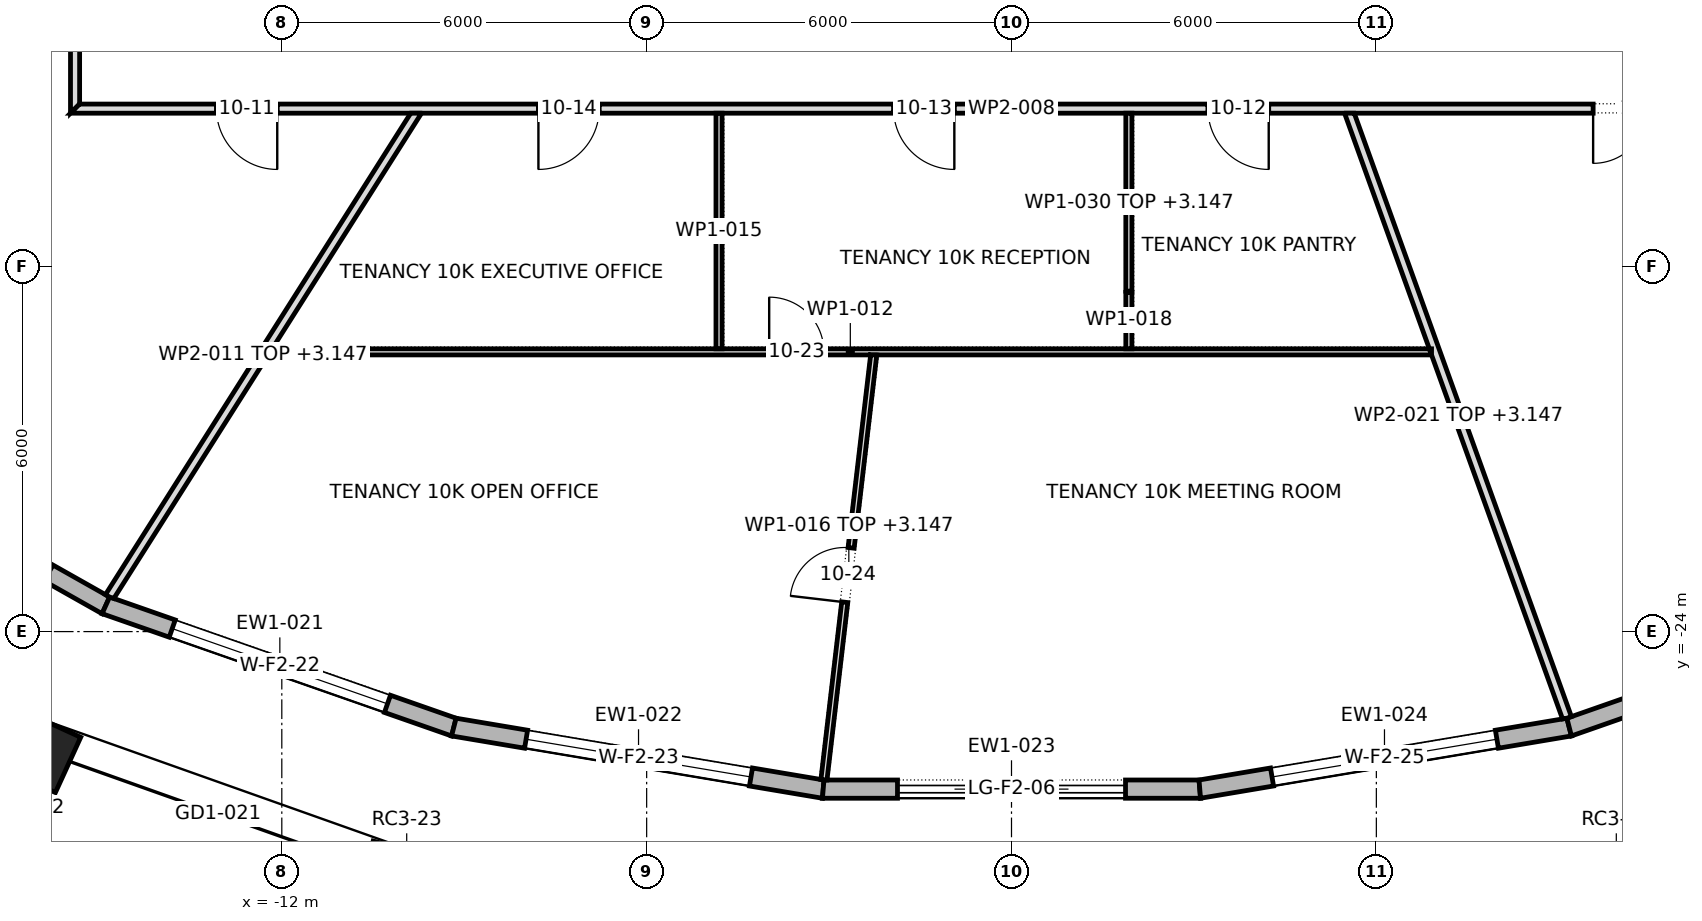
"""IFC4 building model, lengths in metres.
Left out: names, types, materials, properties, quantities, classifications, styles, units other than length and angle.
Written with IfcOpenShell. Run it as: python <this file> out.ifc"""

import sys

from ifc_helpers import new_model, si_unit, direction, frame, frame_2d, origin, origin_2d, place, context, subcontext, project, spatial, polyline, rectangle, outline, extrude, element, fill, save


model = new_model("IFC4")
c1 = context("Model", 3, precision=1e-05, world=origin(), true_north=direction((0.0, 1.0)))
c2 = subcontext(c1, "Body", "Model", "MODEL_VIEW")
j1 = project(units=[si_unit("LENGTHUNIT", "METRE"), si_unit("PLANEANGLEUNIT", "RADIAN")], contexts=[c1])
p1 = place(None, origin())
s1 = spatial("IfcSite", under=j1, at=p1, CompositionType="ELEMENT")
p2 = place(p1, origin())
s2 = spatial("IfcBuilding", under=s1, at=p2, CompositionType="ELEMENT")
p3 = place(p2, frame((0.0, 0.0, 142.3)))
s3 = spatial("IfcBuildingStorey", under=s2, at=p3, CompositionType="ELEMENT", Elevation=142.3)
p4 = place(p3, frame((-16.152, -25.901, 0.0), z_axis=(0.0, 0.0, 1.0), x_axis=(0.909127095833, -0.416518815449, 0.0)))
e1 = element("IfcColumn", 1, at=p4, inside=s3, PredefinedType="COLUMN", context=c2, shape_type="SweptSolid", body=[
    extrude(rectangle(XDim=1.4, YDim=1.0, at=origin_2d()), origin(), (0.0, 0.0, 1.0), 4.2),
])
p5 = place(p3, frame((-20.046, -20.661, 0.0), z_axis=(0.0, 0.0, 1.0), x_axis=(0.870912346166, -0.491438384028, 0.0)))
e2 = element("IfcWall", 2, at=p5, inside=s3, PredefinedType="STANDARD", context=c2, shape_type="SweptSolid", body=[
    extrude(outline(polyline([(-0.014, -0.15), (5.929, -0.15), (5.902, 0.15), (0.014, 0.15), (-0.014, -0.15)])), origin(), (0.0, 0.0, 1.0), 3.9),
])
p6 = place(p5, frame((1.083, 0.0, 0.6)))
e3 = element("IfcOpeningElement", 3, at=p6, cuts=e2, PredefinedType="OPENING", context=c2, shape_type="SweptSolid", body=[
    extrude(rectangle(XDim=3.75, YDim=2.85, at=frame_2d((1.875, 1.425))), frame((0.0, 0.162, 0.0), z_axis=(0.0, -1.0, 0.0), x_axis=(1.0, 0.0, 0.0)), (0.0, 0.0, 1.0), 0.324),
])
p7 = place(p3, frame((-14.894, -23.569, 0.0), z_axis=(0.0, 0.0, 1.0), x_axis=(0.943925510212, -0.330158494016, 0.0)))
e4 = element("IfcWall", 4, at=p7, inside=s3, PredefinedType="STANDARD", context=c2, shape_type="SweptSolid", body=[
    extrude(outline(polyline([(-0.013, -0.15), (6.076, -0.15), (6.05, 0.15), (0.013, 0.15), (-0.013, -0.15)])), origin(), (0.0, 0.0, 1.0), 3.9),
])
p8 = place(p7, frame((1.156, 0.0, 0.6)))
e5 = element("IfcOpeningElement", 5, at=p8, cuts=e4, PredefinedType="OPENING", context=c2, shape_type="SweptSolid", body=[
    extrude(rectangle(XDim=3.75, YDim=2.85, at=frame_2d((1.875, 1.425))), frame((0.0, 0.162, 0.0), z_axis=(0.0, -1.0, 0.0), x_axis=(1.0, 0.0, 0.0)), (0.0, 0.0, 1.0), 0.324),
])
p9 = place(p3, frame((-9.171, -25.57, 0.0), z_axis=(0.0, 0.0, 1.0), x_axis=(0.986186393203, -0.165639360845, 0.0)))
e6 = element("IfcWall", 6, at=p9, inside=s3, PredefinedType="STANDARD", context=c2, shape_type="SweptSolid", body=[
    extrude(outline(polyline([(-0.013, -0.15), (6.172, -0.15), (6.147, 0.15), (0.013, 0.15), (-0.013, -0.15)])), origin(), (0.0, 0.0, 1.0), 3.9),
])
p10 = place(p9, frame((1.205, 0.0, 0.6)))
e7 = element("IfcOpeningElement", 7, at=p10, cuts=e6, PredefinedType="OPENING", context=c2, shape_type="SweptSolid", body=[
    extrude(rectangle(XDim=3.75, YDim=2.85, at=frame_2d((1.875, 1.425))), frame((0.0, 0.162, 0.0), z_axis=(0.0, -1.0, 0.0), x_axis=(1.0, 0.0, 0.0)), (0.0, 0.0, 1.0), 0.324),
])
p11 = place(p3, frame((-3.096, -26.591, 0.0), z_axis=(0.0, 0.0, 1.0), x_axis=(1.0, 0.0, 0.0)))
e8 = element("IfcWall", 8, at=p11, inside=s3, PredefinedType="STANDARD", context=c2, shape_type="SweptSolid", body=[
    extrude(outline(polyline([(-0.012, -0.15), (6.205, -0.15), (6.18, 0.15), (0.012, 0.15), (-0.012, -0.15)])), origin(), (0.0, 0.0, 1.0), 3.9),
])
p12 = place(p11, frame((1.221, 0.0, 0.0)))
e9 = element("IfcOpeningElement", 9, at=p12, cuts=e8, PredefinedType="OPENING", context=c2, shape_type="SweptSolid", body=[
    extrude(rectangle(XDim=3.75, YDim=3.45, at=frame_2d((1.875, 1.725))), frame((0.0, 0.162, 0.0), z_axis=(0.0, -1.0, 0.0), x_axis=(1.0, 0.0, 0.0)), (0.0, 0.0, 1.0), 0.324),
])
p13 = place(p3, frame((3.096, -26.591, 0.0), z_axis=(0.0, 0.0, 1.0), x_axis=(0.986186393203, 0.165639360845, 0.0)))
e10 = element("IfcWall", 10, at=p13, inside=s3, PredefinedType="STANDARD", context=c2, shape_type="SweptSolid", body=[
    extrude(outline(polyline([(-0.012, -0.15), (6.172, -0.15), (6.147, 0.15), (0.012, 0.15), (-0.012, -0.15)])), origin(), (0.0, 0.0, 1.0), 3.9),
])
p14 = place(p13, frame((1.205, 0.0, 0.6)))
e11 = element("IfcOpeningElement", 11, at=p14, cuts=e10, PredefinedType="OPENING", context=c2, shape_type="SweptSolid", body=[
    extrude(rectangle(XDim=3.75, YDim=2.85, at=frame_2d((1.875, 1.425))), frame((0.0, 0.162, 0.0), z_axis=(0.0, -1.0, 0.0), x_axis=(1.0, 0.0, 0.0)), (0.0, 0.0, 1.0), 0.324),
])
p15 = place(p3, frame((9.171, -25.57, 0.0), z_axis=(0.0, 0.0, 1.0), x_axis=(0.943925510212, 0.330158494016, 0.0)))
e12 = element("IfcWall", 12, at=p15, inside=s3, PredefinedType="STANDARD", context=c2, shape_type="SweptSolid", body=[
    extrude(outline(polyline([(-0.013, -0.15), (6.076, -0.15), (6.05, 0.15), (0.013, 0.15), (-0.013, -0.15)])), origin(), (0.0, 0.0, 1.0), 3.9),
])
p16 = place(p15, frame((1.156, 0.0, 0.6)))
e13 = element("IfcOpeningElement", 13, at=p16, cuts=e12, PredefinedType="OPENING", context=c2, shape_type="SweptSolid", body=[
    extrude(rectangle(XDim=3.75, YDim=2.85, at=frame_2d((1.875, 1.425))), frame((0.0, 0.162, 0.0), z_axis=(0.0, -1.0, 0.0), x_axis=(1.0, 0.0, 0.0)), (0.0, 0.0, 1.0), 0.324),
])
p17 = place(p3, frame((-24.324, -16.859, 0.0), z_axis=(0.0, 0.0, 1.0), x_axis=(0.821700462415, 0.569919599652, 0.0)))
e14 = element("IfcWall", 14, at=p17, inside=s3, PredefinedType="PARTITIONING", context=c2, shape_type="SweptSolid", body=[
    extrude(outline(polyline([(0.025, -0.075), (1.807, -0.075), (3.589, -0.075), (5.371, -0.075), (7.153, -0.075), (8.935, -0.075), (10.717, -0.075), (10.82, 0.074), (10.82, 0.075), (9.249, 0.075), (7.677, 0.075), (6.105, 0.075), (6.104, 0.073), (6.102, 0.075), (4.576, 0.075), (3.051, 0.075), (1.525, 0.075), (0.0, 0.075), (0.0, 0.071), (0.004, 0.002), (0.025, -0.075)])), origin(), (0.0, 0.0, 1.0), 3.147),
])
p18 = place(p3, frame((-15.4, -15.475, 0.0), z_axis=(0.0, 0.0, 1.0), x_axis=(0.0, 1.0, 0.0)))
e15 = element("IfcWall", 15, at=p18, inside=s3, PredefinedType="PARTITIONING", context=c2, shape_type="SweptSolid", body=[
    extrude(outline(polyline([(0.15, -0.075), (2.066, -0.075), (3.981, -0.075), (5.897, -0.075), (7.812, -0.075), (9.728, -0.075), (11.644, -0.075), (13.56, -0.075), (15.475, -0.075), (17.391, -0.075), (19.306, -0.075), (21.222, -0.075), (23.138, -0.075), (25.053, -0.075), (26.969, -0.075), (28.885, -0.075), (30.8, -0.075), (30.95, 0.075), (29.016, 0.075), (27.081, 0.075), (25.147, 0.075), (23.212, 0.075), (21.278, 0.075), (19.344, 0.075), (17.409, 0.075), (15.475, 0.075), (13.541, 0.075), (11.606, 0.075), (9.672, 0.075), (7.738, 0.075), (5.803, 0.075), (3.869, 0.075), (1.935, 0.075), (0.0, 0.075), (0.15, -0.075)])), origin(), (0.0, 0.0, 1.0), 3.9),
])
p19 = place(p18, frame((24.245, 0.0, 0.0)))
e16 = element("IfcOpeningElement", 16, at=p19, cuts=e15, PredefinedType="OPENING", context=c2, shape_type="SweptSolid", body=[
    extrude(rectangle(XDim=1.8, YDim=2.1, at=frame_2d((0.9, 1.05))), frame((0.0, 0.087, 0.0), z_axis=(0.0, -1.0, 0.0), x_axis=(1.0, 0.0, 0.0)), (0.0, 0.0, 1.0), 0.174),
])
p20 = place(p18, frame((16.305, 0.0, 0.0)))
e17 = element("IfcOpeningElement", 17, at=p20, cuts=e15, PredefinedType="OPENING", context=c2, shape_type="SweptSolid", body=[
    extrude(rectangle(XDim=1.0, YDim=2.1, at=frame_2d((0.5, 1.05))), frame((0.0, 0.087, 0.0), z_axis=(0.0, -1.0, 0.0), x_axis=(1.0, 0.0, 0.0)), (0.0, 0.0, 1.0), 0.174),
])
p21 = place(p18, frame((9.0, 0.0, 0.0)))
e18 = element("IfcOpeningElement", 18, at=p21, cuts=e15, PredefinedType="OPENING", context=c2, shape_type="SweptSolid", body=[
    extrude(rectangle(XDim=1.0, YDim=2.1, at=frame_2d((0.5, 1.05))), frame((0.0, 0.087, 0.0), z_axis=(0.0, -1.0, 0.0), x_axis=(1.0, 0.0, 0.0)), (0.0, 0.0, 1.0), 0.174),
])
p22 = place(p3, frame((-15.475, -15.4, 0.0), z_axis=(0.0, 0.0, 1.0), x_axis=(1.0, 0.0, 0.0)))
e19 = element("IfcWall", 19, at=p22, inside=s3, PredefinedType="PARTITIONING", context=c2, shape_type="SweptSolid", body=[
    extrude(outline(polyline([(0.0, -0.075), (1.935, -0.075), (3.869, -0.075), (5.803, -0.075), (7.738, -0.075), (9.672, -0.075), (11.606, -0.075), (13.541, -0.075), (15.475, -0.075), (17.409, -0.075), (19.344, -0.075), (21.278, -0.075), (23.212, -0.075), (25.147, -0.075), (27.081, -0.075), (29.016, -0.075), (30.95, -0.075), (30.8, 0.075), (28.885, 0.075), (26.969, 0.075), (25.053, 0.075), (23.138, 0.075), (21.222, 0.075), (19.306, 0.075), (17.391, 0.075), (15.475, 0.075), (13.56, 0.075), (11.644, 0.075), (9.728, 0.075), (7.812, 0.075), (5.897, 0.075), (3.981, 0.075), (2.066, 0.075), (0.15, 0.075), (0.0, -0.075)])), origin(), (0.0, 0.0, 1.0), 3.9),
])
p23 = place(p22, frame((2.4, 0.0, 0.0)))
e20 = element("IfcOpeningElement", 20, at=p23, cuts=e19, PredefinedType="OPENING", context=c2, shape_type="SweptSolid", body=[
    extrude(rectangle(XDim=1.0, YDim=2.1, at=frame_2d((0.5, 1.05))), frame((0.0, 0.087, 0.0), z_axis=(0.0, -1.0, 0.0), x_axis=(1.0, 0.0, 0.0)), (0.0, 0.0, 1.0), 0.174),
])
p24 = place(p22, frame((18.705, 0.0, 0.0)))
e21 = element("IfcOpeningElement", 21, at=p24, cuts=e19, PredefinedType="OPENING", context=c2, shape_type="SweptSolid", body=[
    extrude(rectangle(XDim=1.0, YDim=2.1, at=frame_2d((0.5, 1.05))), frame((0.0, 0.087, 0.0), z_axis=(0.0, -1.0, 0.0), x_axis=(1.0, 0.0, 0.0)), (0.0, 0.0, 1.0), 0.174),
])
p25 = place(p22, frame((13.535, 0.0, 0.0)))
e22 = element("IfcOpeningElement", 22, at=p25, cuts=e19, PredefinedType="OPENING", context=c2, shape_type="SweptSolid", body=[
    extrude(rectangle(XDim=1.0, YDim=2.1, at=frame_2d((0.5, 1.05))), frame((0.0, 0.087, 0.0), z_axis=(0.0, -1.0, 0.0), x_axis=(1.0, 0.0, 0.0)), (0.0, 0.0, 1.0), 0.174),
])
p26 = place(p22, frame((7.695, 0.0, 0.0)))
e23 = element("IfcOpeningElement", 23, at=p26, cuts=e19, PredefinedType="OPENING", context=c2, shape_type="SweptSolid", body=[
    extrude(rectangle(XDim=1.0, YDim=2.1, at=frame_2d((0.5, 1.05))), frame((0.0, 0.087, 0.0), z_axis=(0.0, -1.0, 0.0), x_axis=(1.0, 0.0, 0.0)), (0.0, 0.0, 1.0), 0.174),
])
p27 = place(p22, frame((25.04, 0.0, 0.0)))
e24 = element("IfcOpeningElement", 24, at=p27, cuts=e19, PredefinedType="OPENING", context=c2, shape_type="SweptSolid", body=[
    extrude(rectangle(XDim=1.8, YDim=2.1, at=frame_2d((0.9, 1.05))), frame((0.0, 0.087, 0.0), z_axis=(0.0, -1.0, 0.0), x_axis=(1.0, 0.0, 0.0)), (0.0, 0.0, 1.0), 0.174),
])
p28 = place(p3, frame((-14.837, -23.432, 0.0), z_axis=(0.0, 0.0, 1.0), x_axis=(0.535485065479, 0.844544696655, 0.0)))
e25 = element("IfcWall", 25, at=p28, inside=s3, PredefinedType="PARTITIONING", context=c2, shape_type="SweptSolid", body=[
    extrude(outline(polyline([(0.02, -0.075), (1.639, -0.075), (3.257, -0.075), (4.876, -0.075), (4.88, -0.073), (4.881, -0.075), (6.411, -0.075), (7.94, -0.075), (9.469, -0.075), (9.469, -0.074), (9.375, 0.075), (7.5, 0.075), (5.625, 0.075), (3.75, 0.075), (1.875, 0.075), (0.0, 0.075), (0.0, 0.066), (0.004, -0.004), (0.02, -0.075)])), origin(), (0.0, 0.0, 1.0), 3.147),
])
p29 = place(p3, frame((-12.222, -19.4, 0.0), z_axis=(0.0, 0.0, 1.0), x_axis=(1.0, 0.0, 0.0)))
e26 = element("IfcWall", 26, at=p29, inside=s3, PredefinedType="PARTITIONING", context=c2, shape_type="SweptSolid", body=[
    extrude(outline(polyline([(0.0, -0.05), (1.981, -0.05), (3.962, -0.05), (5.944, -0.05), (7.925, -0.05), (9.906, -0.05), (9.906, -0.049), (9.916, -0.05), (11.759, -0.05), (13.602, -0.05), (15.444, -0.05), (17.287, -0.05), (19.13, -0.05), (19.13, -0.05), (19.094, 0.05), (17.464, 0.05), (15.833, 0.05), (14.202, 0.05), (14.202, 0.05), (14.102, 0.05), (14.102, 0.05), (12.442, 0.05), (10.782, 0.05), (9.122, 0.05), (7.462, 0.05), (7.462, 0.05), (7.362, 0.05), (7.362, 0.05), (5.538, 0.05), (3.713, 0.05), (1.888, 0.05), (0.063, 0.05), (0.0, -0.049), (0.0, -0.05)])), origin(), (0.0, 0.0, 1.0), 3.9),
])
p30 = place(p29, frame((8.238, 0.0, 0.0)))
e27 = element("IfcOpeningElement", 27, at=p30, cuts=e26, PredefinedType="OPENING", context=c2, shape_type="SweptSolid", body=[
    extrude(rectangle(XDim=0.9, YDim=2.1, at=frame_2d((0.45, 1.05))), frame((0.0, 0.062, 0.0), z_axis=(0.0, -1.0, 0.0), x_axis=(1.0, 0.0, 0.0)), (0.0, 0.0, 1.0), 0.124),
])
p31 = place(p3, frame((-4.81, -19.35, 0.0), z_axis=(0.0, 0.0, 1.0), x_axis=(0.0, 1.0, 0.0)))
e28 = element("IfcWall", 28, at=p31, inside=s3, PredefinedType="PARTITIONING", context=c2, shape_type="SweptSolid", body=[
    extrude(rectangle(XDim=3.875, YDim=0.1, at=frame_2d((1.938, 0.0))), origin(), (0.0, 0.0, 1.0), 3.9),
])
p32 = place(p3, frame((-2.265, -19.444, 0.0), z_axis=(0.0, 0.0, 1.0), x_axis=(-0.116388626605, -0.993203749287, 0.0)))
e29 = element("IfcWall", 29, at=p32, inside=s3, PredefinedType="PARTITIONING", context=c2, shape_type="SweptSolid", body=[
    extrude(outline(polyline([(0.012, -0.05), (1.769, -0.05), (3.527, -0.05), (5.284, -0.05), (7.042, -0.05), (7.042, -0.049), (7.042, 0.022), (7.039, 0.05), (5.279, 0.05), (3.519, 0.05), (1.76, 0.05), (0.0, 0.05), (0.012, -0.05)])), origin(), (0.0, 0.0, 1.0), 3.147),
])
p33 = place(p32, frame((3.201, 0.0, 0.0)))
e30 = element("IfcOpeningElement", 30, at=p33, cuts=e29, PredefinedType="OPENING", context=c2, shape_type="SweptSolid", body=[
    extrude(rectangle(XDim=0.9, YDim=2.1, at=frame_2d((0.45, 1.05))), frame((0.0, 0.062, 0.0), z_axis=(0.0, -1.0, 0.0), x_axis=(1.0, 0.0, 0.0)), (0.0, 0.0, 1.0), 0.124),
])
p34 = place(p3, frame((1.93, -19.35, 0.0), z_axis=(0.0, 0.0, 1.0), x_axis=(0.0, 1.0, 0.0)))
e31 = element("IfcWall", 31, at=p34, inside=s3, PredefinedType="PARTITIONING", context=c2, shape_type="SweptSolid", body=[
    extrude(rectangle(XDim=0.938, YDim=0.1, at=frame_2d((0.469, 0.0))), origin(), (0.0, 0.0, 1.0), 3.9),
])
p35 = place(p3, frame((5.548, -15.45, 0.0), z_axis=(0.0, 0.0, 1.0), x_axis=(0.338602834386, -0.940929391902, 0.0)))
e32 = element("IfcWall", 32, at=p35, inside=s3, PredefinedType="PARTITIONING", context=c2, shape_type="SweptSolid", body=[
    extrude(outline(polyline([(0.0, -0.075), (1.373, -0.075), (2.745, -0.075), (4.118, -0.075), (4.13, -0.041), (4.224, -0.075), (5.814, -0.075), (7.405, -0.075), (8.996, -0.075), (10.586, -0.075), (10.599, -0.004), (10.6, 0.048), (10.6, 0.075), (8.842, 0.075), (7.084, 0.075), (5.327, 0.075), (3.569, 0.075), (1.811, 0.075), (0.054, 0.075), (0.0, -0.074), (0.0, -0.075)])), origin(), (0.0, 0.0, 1.0), 3.147),
])
p36 = place(p3, frame((1.93, -18.412, 0.0), z_axis=(0.0, 0.0, 1.0), x_axis=(0.0, 1.0, 0.0)))
e33 = element("IfcWall", 33, at=p36, inside=s3, PredefinedType="PARTITIONING", context=c2, shape_type="SweptSolid", body=[
    extrude(rectangle(XDim=2.937, YDim=0.1, at=frame_2d((1.469, 0.0))), origin(), (0.0, 0.0, 1.0), 3.147),
])
p37 = place(p8, origin())
e34 = element("IfcWindow", 34, at=p37, inside=s3, PartitioningType="TRIPLE_PANEL_VERTICAL", PredefinedType="WINDOW", context=c2, shape_type="SweptSolid", body=[
    extrude(rectangle(XDim=3.75, YDim=2.85, at=frame_2d((1.875, 1.425))), frame((0.0, 0.03, 0.0), z_axis=(0.0, -1.0, 0.0), x_axis=(1.0, 0.0, 0.0)), (0.0, 0.0, 1.0), 0.06),
])
fill(e5, e34)
p38 = place(p10, origin())
e35 = element("IfcWindow", 35, at=p38, inside=s3, PartitioningType="TRIPLE_PANEL_VERTICAL", PredefinedType="WINDOW", context=c2, shape_type="SweptSolid", body=[
    extrude(rectangle(XDim=3.75, YDim=2.85, at=frame_2d((1.875, 1.425))), frame((0.0, 0.03, 0.0), z_axis=(0.0, -1.0, 0.0), x_axis=(1.0, 0.0, 0.0)), (0.0, 0.0, 1.0), 0.06),
])
fill(e7, e35)
p39 = place(p12, origin())
e36 = element("IfcDoor", 36, at=p39, inside=s3, OperationType="DOUBLE_DOOR_SLIDING", PredefinedType="DOOR", context=c2, shape_type="SweptSolid", body=[
    extrude(rectangle(XDim=3.75, YDim=3.45, at=frame_2d((1.875, 1.725))), frame((0.0, 0.025, 0.0), z_axis=(0.0, -1.0, 0.0), x_axis=(1.0, 0.0, 0.0)), (0.0, 0.0, 1.0), 0.05),
])
fill(e9, e36)
p40 = place(p14, origin())
e37 = element("IfcWindow", 37, at=p40, inside=s3, PartitioningType="TRIPLE_PANEL_VERTICAL", PredefinedType="WINDOW", context=c2, shape_type="SweptSolid", body=[
    extrude(rectangle(XDim=3.75, YDim=2.85, at=frame_2d((1.875, 1.425))), frame((0.0, 0.03, 0.0), z_axis=(0.0, -1.0, 0.0), x_axis=(1.0, 0.0, 0.0)), (0.0, 0.0, 1.0), 0.06),
])
fill(e11, e37)
p41 = place(p23, frame((1.0, 0.0, 0.0), z_axis=(0.0, 0.0, 1.0), x_axis=(-1.0, 0.0, 0.0)))
e38 = element("IfcDoor", 38, at=p41, inside=s3, OperationType="SINGLE_SWING_RIGHT", PredefinedType="DOOR", context=c2, shape_type="SweptSolid", body=[
    extrude(rectangle(XDim=1.0, YDim=2.1, at=frame_2d((0.5, 1.05))), frame((0.0, 0.025, 0.0), z_axis=(0.0, -1.0, 0.0), x_axis=(1.0, 0.0, 0.0)), (0.0, 0.0, 1.0), 0.05),
])
fill(e20, e38)
p42 = place(p24, frame((1.0, 0.0, 0.0), z_axis=(0.0, 0.0, 1.0), x_axis=(-1.0, 0.0, 0.0)))
e39 = element("IfcDoor", 39, at=p42, inside=s3, OperationType="SINGLE_SWING_RIGHT", PredefinedType="DOOR", context=c2, shape_type="SweptSolid", body=[
    extrude(rectangle(XDim=1.0, YDim=2.1, at=frame_2d((0.5, 1.05))), frame((0.0, 0.025, 0.0), z_axis=(0.0, -1.0, 0.0), x_axis=(1.0, 0.0, 0.0)), (0.0, 0.0, 1.0), 0.05),
])
fill(e21, e39)
p43 = place(p25, frame((1.0, 0.0, 0.0), z_axis=(0.0, 0.0, 1.0), x_axis=(-1.0, 0.0, 0.0)))
e40 = element("IfcDoor", 40, at=p43, inside=s3, OperationType="SINGLE_SWING_RIGHT", PredefinedType="DOOR", context=c2, shape_type="SweptSolid", body=[
    extrude(rectangle(XDim=1.0, YDim=2.1, at=frame_2d((0.5, 1.05))), frame((0.0, 0.025, 0.0), z_axis=(0.0, -1.0, 0.0), x_axis=(1.0, 0.0, 0.0)), (0.0, 0.0, 1.0), 0.05),
])
fill(e22, e40)
p44 = place(p26, frame((1.0, 0.0, 0.0), z_axis=(0.0, 0.0, 1.0), x_axis=(-1.0, 0.0, 0.0)))
e41 = element("IfcDoor", 41, at=p44, inside=s3, OperationType="SINGLE_SWING_LEFT", PredefinedType="DOOR", context=c2, shape_type="SweptSolid", body=[
    extrude(rectangle(XDim=1.0, YDim=2.1, at=frame_2d((0.5, 1.05))), frame((0.0, 0.025, 0.0), z_axis=(0.0, -1.0, 0.0), x_axis=(1.0, 0.0, 0.0)), (0.0, 0.0, 1.0), 0.05),
])
fill(e23, e41)
p45 = place(p27, frame((1.8, 0.0, 0.0), z_axis=(0.0, 0.0, 1.0), x_axis=(-1.0, 0.0, 0.0)))
e42 = element("IfcDoor", 42, at=p45, inside=s3, OperationType="DOUBLE_DOOR_SINGLE_SWING", PredefinedType="DOOR", context=c2, shape_type="SweptSolid", body=[
    extrude(rectangle(XDim=1.8, YDim=2.1, at=frame_2d((0.9, 1.05))), frame((0.0, 0.025, 0.0), z_axis=(0.0, -1.0, 0.0), x_axis=(1.0, 0.0, 0.0)), (0.0, 0.0, 1.0), 0.05),
])
fill(e24, e42)
p46 = place(p30, origin())
e43 = element("IfcDoor", 43, at=p46, inside=s3, OperationType="SINGLE_SWING_RIGHT", PredefinedType="DOOR", context=c2, shape_type="SweptSolid", body=[
    extrude(rectangle(XDim=0.9, YDim=2.1, at=frame_2d((0.45, 1.05))), frame((0.0, 0.025, 0.0), z_axis=(0.0, -1.0, 0.0), x_axis=(1.0, 0.0, 0.0)), (0.0, 0.0, 1.0), 0.05),
])
fill(e27, e43)
p47 = place(p33, frame((0.9, 0.0, 0.0), z_axis=(0.0, 0.0, 1.0), x_axis=(-1.0, 0.0, 0.0)))
e44 = element("IfcDoor", 44, at=p47, inside=s3, OperationType="SINGLE_SWING_RIGHT", PredefinedType="DOOR", context=c2, shape_type="SweptSolid", body=[
    extrude(rectangle(XDim=0.9, YDim=2.1, at=frame_2d((0.45, 1.05))), frame((0.0, 0.025, 0.0), z_axis=(0.0, -1.0, 0.0), x_axis=(1.0, 0.0, 0.0)), (0.0, 0.0, 1.0), 0.05),
])
fill(e30, e44)
save(model, sys.argv[1])
